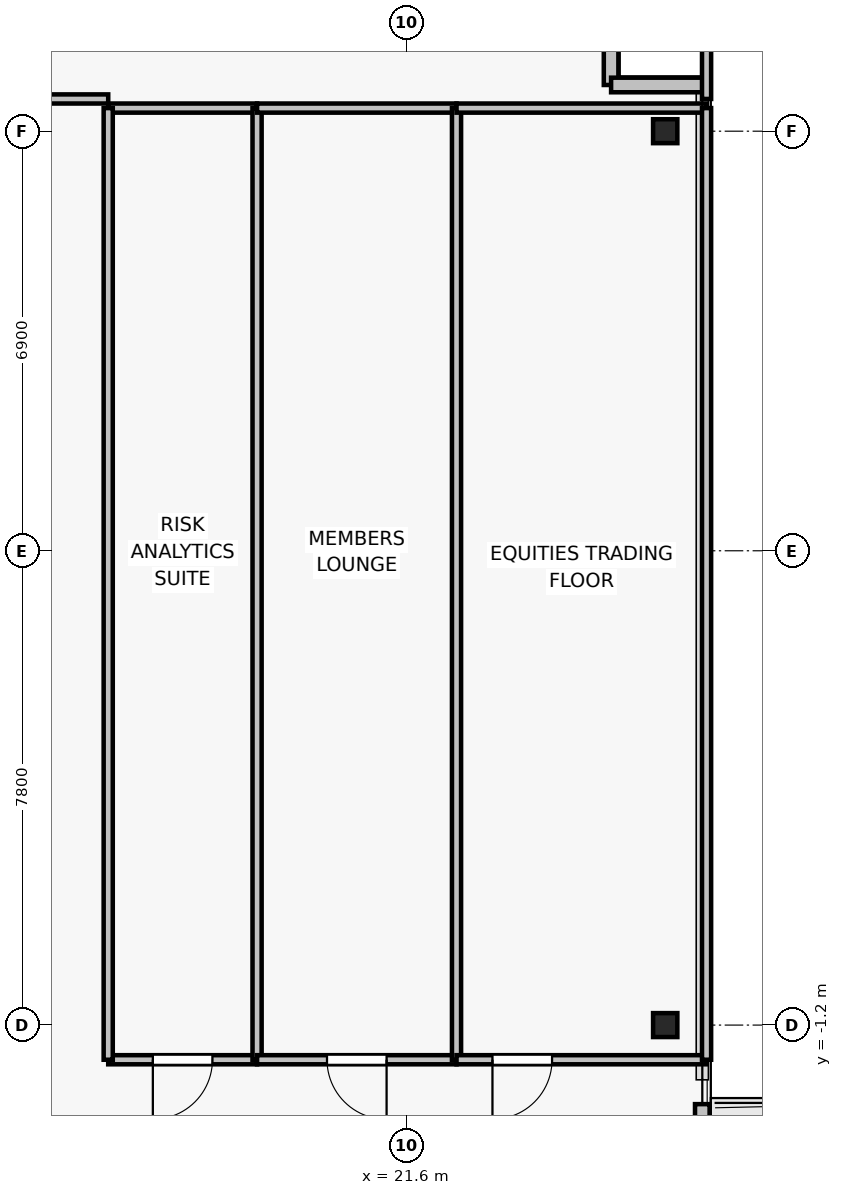
"""IFC4 building model, lengths in metres.
Left out: names, types, materials, properties, quantities, classifications, styles, units other than length and angle.
Written with IfcOpenShell. Run it as: python <this file> out.ifc"""

import sys

from ifc_helpers import new_model, si_unit, direction, frame, frame_2d, origin, origin_2d, place, context, subcontext, project, spatial, rectangle, i_section, extrude, source, transform, mapped, element, fill, save


model = new_model("IFC4")
c1 = context("Model", 3, precision=1e-05, world=origin(), true_north=direction((0.0, 1.0)))
c2 = subcontext(c1, "Body", "Model", "MODEL_VIEW")
j1 = project(units=[si_unit("LENGTHUNIT", "METRE"), si_unit("PLANEANGLEUNIT", "RADIAN")], contexts=[c1])
p1 = place(None, origin())
s1 = spatial("IfcSite", under=j1, at=p1, CompositionType="ELEMENT")
p2 = place(p1, origin())
s2 = spatial("IfcBuilding", under=s1, at=p2, CompositionType="ELEMENT")
p3 = place(p2, frame((0.0, 0.0, 189.1)))
s3 = spatial("IfcBuildingStorey", under=s2, at=p3, CompositionType="ELEMENT", Elevation=189.1)
for number, where, z_axis, x_axis in (
    (1, (25.85, -1.2, 0.0), (0.0, 0.0, 1.0), (1.0, 0.0, 0.0)),
    (2, (25.85, 13.5, 0.0), (0.0, 0.0, 1.0), (1.0, 0.0, 0.0)),
):
    element("IfcColumn", number, at=place(p3, frame(where, z_axis=z_axis, x_axis=x_axis)), inside=s3, PredefinedType="COLUMN", context=c2, shape_type="SweptSolid", body=[
        extrude(i_section(OverallWidth=0.399, OverallDepth=0.394, WebThickness=0.023, FlangeThickness=0.037, FilletRadius=0.015, at=origin_2d()), origin(), (0.0, 0.0, 1.0), 3.3),
    ])
p4 = place(p3, frame((26.46, -2.5, 0.0), z_axis=(0.0, 0.0, 1.0), x_axis=(0.0, -1.0, 0.0)))
e3 = element("IfcWall", 3, at=p4, inside=s3, PredefinedType="SOLIDWALL", context=c2, shape_type="SweptSolid", body=[
    extrude(rectangle(XDim=5.8, YDim=0.24, at=frame_2d((2.9, 0.0))), origin(), (0.0, 0.0, 1.0), 3.075),
])
p5 = place(p4, frame((1.566, 0.0, 0.0)))
e4 = element("IfcOpeningElement", 4, at=p5, cuts=e3, PredefinedType="OPENING", context=c2, shape_type="SweptSolid", body=[
    extrude(rectangle(XDim=1.0, YDim=2.2, at=frame_2d((0.5, 1.1))), frame((0.0, 0.13, 0.0), z_axis=(0.0, -1.0, 0.0), x_axis=(1.0, 0.0, 0.0)), (0.0, 0.0, 1.0), 0.26),
])
p6 = place(p4, frame((2.916, 0.0, 0.85)))
e5 = element("IfcOpeningElement", 5, at=p6, cuts=e3, PredefinedType="OPENING", context=c2, shape_type="SweptSolid", body=[
    extrude(rectangle(XDim=0.9, YDim=1.35, at=frame_2d((0.45, 0.675))), frame((0.0, 0.13, 0.0), z_axis=(0.0, -1.0, 0.0), x_axis=(1.0, 0.0, 0.0)), (0.0, 0.0, 1.0), 0.26),
])
for number, where, z_axis, x_axis in (
    (6, (24.96, 14.26, 0.0), (0.0, 0.0, 1.0), (0.0, 1.0, 0.0)),
    (7, (26.46, 14.26, 0.0), (0.0, 0.0, 1.0), (-1.0, 0.0, 0.0)),
):
    element("IfcWall", number, at=place(p3, frame(where, z_axis=z_axis, x_axis=x_axis)), inside=s3, PredefinedType="SOLIDWALL", context=c2, shape_type="SweptSolid", body=[
        extrude(rectangle(XDim=1.5, YDim=0.24, at=frame_2d((0.75, 0.0))), origin(), (0.0, 0.0, 1.0), 3.075),
    ])
p7 = place(p3, frame((19.138, -1.77, 0.0), z_axis=(0.0, 0.0, 1.0), x_axis=(-1.0, 0.0, 0.0)))
e8 = element("IfcWall", 8, at=p7, inside=s3, PredefinedType="PARTITIONING", context=c2, shape_type="SweptSolid", body=[
    extrude(rectangle(XDim=2.448, YDim=0.15, at=frame_2d((1.224, 0.0))), origin(), (0.0, 0.0, 1.0), 3.075),
])
p8 = place(p7, frame((0.734, 0.0, 0.0)))
e9 = element("IfcOpeningElement", 9, at=p8, cuts=e8, PredefinedType="OPENING", context=c2, shape_type="SweptSolid", body=[
    extrude(rectangle(XDim=0.98, YDim=2.15, at=frame_2d((0.49, 1.075))), frame((0.0, 0.085, 0.0), z_axis=(0.0, -1.0, 0.0), x_axis=(1.0, 0.0, 0.0)), (0.0, 0.0, 1.0), 0.17),
])
p9 = place(p3, frame((16.69, 13.88, 0.0), z_axis=(0.0, 0.0, 1.0), x_axis=(1.0, 0.0, 0.0)))
e10 = element("IfcWall", 10, at=p9, inside=s3, PredefinedType="PARTITIONING", context=c2, shape_type="SweptSolid", body=[
    extrude(rectangle(XDim=2.448, YDim=0.15, at=frame_2d((1.224, 0.0))), origin(), (0.0, 0.0, 1.0), 3.075),
])
for number, where, z_axis, x_axis in (
    (11, (16.69, -1.77, 0.0), (0.0, 0.0, 1.0), (0.0, 1.0, 0.0)),
    (12, (19.138, 13.88, 0.0), (0.0, 0.0, 1.0), (0.0, -1.0, 0.0)),
):
    element("IfcWall", number, at=place(p3, frame(where, z_axis=z_axis, x_axis=x_axis)), inside=s3, PredefinedType="PARTITIONING", context=c2, shape_type="SweptSolid", body=[
        extrude(rectangle(XDim=15.65, YDim=0.15, at=frame_2d((7.825, 0.0))), origin(), (0.0, 0.0, 1.0), 2.565),
    ])
p10 = place(p3, frame((22.418, -1.77, 0.0), z_axis=(0.0, 0.0, 1.0), x_axis=(-1.0, 0.0, 0.0)))
e13 = element("IfcWall", 13, at=p10, inside=s3, PredefinedType="PARTITIONING", context=c2, shape_type="SweptSolid", body=[
    extrude(rectangle(XDim=3.28, YDim=0.15, at=frame_2d((1.64, 0.0))), origin(), (0.0, 0.0, 1.0), 3.075),
])
p11 = place(p10, frame((1.15, 0.0, 0.0)))
e14 = element("IfcOpeningElement", 14, at=p11, cuts=e13, PredefinedType="OPENING", context=c2, shape_type="SweptSolid", body=[
    extrude(rectangle(XDim=0.98, YDim=2.15, at=frame_2d((0.49, 1.075))), frame((0.0, 0.085, 0.0), z_axis=(0.0, -1.0, 0.0), x_axis=(1.0, 0.0, 0.0)), (0.0, 0.0, 1.0), 0.17),
])
p12 = place(p3, frame((19.138, 13.88, 0.0), z_axis=(0.0, 0.0, 1.0), x_axis=(1.0, 0.0, 0.0)))
e15 = element("IfcWall", 15, at=p12, inside=s3, PredefinedType="PARTITIONING", context=c2, shape_type="SweptSolid", body=[
    extrude(rectangle(XDim=3.28, YDim=0.15, at=frame_2d((1.64, 0.0))), origin(), (0.0, 0.0, 1.0), 3.075),
])
p13 = place(p3, frame((22.418, 13.88, 0.0), z_axis=(0.0, 0.0, 1.0), x_axis=(0.0, -1.0, 0.0)))
e16 = element("IfcWall", 16, at=p13, inside=s3, PredefinedType="PARTITIONING", context=c2, shape_type="SweptSolid", body=[
    extrude(rectangle(XDim=15.65, YDim=0.15, at=frame_2d((7.825, 0.0))), origin(), (0.0, 0.0, 1.0), 2.565),
])
p14 = place(p3, frame((26.53, -1.77, 0.0), z_axis=(0.0, 0.0, 1.0), x_axis=(-1.0, 0.0, 0.0)))
e17 = element("IfcWall", 17, at=p14, inside=s3, PredefinedType="PARTITIONING", context=c2, shape_type="SweptSolid", body=[
    extrude(rectangle(XDim=4.112, YDim=0.15, at=frame_2d((2.056, 0.0))), origin(), (0.0, 0.0, 1.0), 2.565),
])
p15 = place(p14, frame((2.541, 0.0, 0.0)))
e18 = element("IfcOpeningElement", 18, at=p15, cuts=e17, PredefinedType="OPENING", context=c2, shape_type="SweptSolid", body=[
    extrude(rectangle(XDim=0.98, YDim=2.15, at=frame_2d((0.49, 1.075))), frame((0.0, 0.085, 0.0), z_axis=(0.0, -1.0, 0.0), x_axis=(1.0, 0.0, 0.0)), (0.0, 0.0, 1.0), 0.17),
])
p16 = place(p3, frame((22.418, 13.88, 0.0), z_axis=(0.0, 0.0, 1.0), x_axis=(1.0, 0.0, 0.0)))
e19 = element("IfcWall", 19, at=p16, inside=s3, PredefinedType="PARTITIONING", context=c2, shape_type="SweptSolid", body=[
    extrude(rectangle(XDim=4.112, YDim=0.15, at=frame_2d((2.056, 0.0))), origin(), (0.0, 0.0, 1.0), 3.075),
])
p17 = place(p3, frame((26.53, 13.88, 0.0), z_axis=(0.0, 0.0, 1.0), x_axis=(0.0, -1.0, 0.0)))
e20 = element("IfcWall", 20, at=p17, inside=s3, PredefinedType="PARTITIONING", context=c2, shape_type="SweptSolid", body=[
    extrude(rectangle(XDim=15.65, YDim=0.15, at=frame_2d((7.825, 0.0))), origin(), (0.0, 0.0, 1.0), 3.075),
])
p18 = place(p3, frame((16.69, 14.03, 0.0), z_axis=(0.0, 0.0, 1.0), x_axis=(-1.0, 0.0, 0.0)))
e21 = element("IfcWall", 21, at=p18, inside=s3, PredefinedType="PARTITIONING", context=c2, shape_type="SweptSolid", body=[
    extrude(rectangle(XDim=2.79, YDim=0.15, at=frame_2d((1.395, 0.0))), origin(), (0.0, 0.0, 1.0), 2.565),
])
p19 = place(p3, frame((26.53, 17.33, 0.0), z_axis=(0.0, 0.0, 1.0), x_axis=(0.0, -1.0, 0.0)))
e22 = element("IfcWall", 22, at=p19, inside=s3, PredefinedType="PARTITIONING", context=c2, shape_type="SweptSolid", body=[
    extrude(rectangle(XDim=3.3, YDim=0.15, at=frame_2d((1.65, 0.0))), origin(), (0.0, 0.0, 1.0), 3.075),
])
m1 = source(origin(), c2, "Body", "SweptSolid", [
    extrude(rectangle(XDim=0.98, YDim=2.15, at=frame_2d((0.49, 1.075))), frame((0.0, 0.025, 0.0), z_axis=(0.0, -1.0, 0.0), x_axis=(1.0, 0.0, 0.0)), (0.0, 0.0, 1.0), 0.05),
])
p20 = place(p8, origin())
e23 = element("IfcDoor", 23, at=p20, inside=s3, OperationType="SINGLE_SWING_RIGHT", PredefinedType="DOOR", context=c2, shape_type="MappedRepresentation", body=[
    mapped(m1, transform((0.0, 0.0, 0.0), x_axis=(1.0, 0.0, 0.0), y_axis=(0.0, 1.0, 0.0), z_axis=(0.0, 0.0, 1.0), scale=1.0)),
])
fill(e9, e23)
p21 = place(p11, origin())
e24 = element("IfcDoor", 24, at=p21, inside=s3, OperationType="SINGLE_SWING_LEFT", PredefinedType="DOOR", context=c2, shape_type="MappedRepresentation", body=[
    mapped(m1, transform((0.0, 0.0, 0.0), x_axis=(1.0, 0.0, 0.0), y_axis=(0.0, 1.0, 0.0), z_axis=(0.0, 0.0, 1.0), scale=1.0)),
])
fill(e14, e24)
p22 = place(p15, origin())
e25 = element("IfcDoor", 25, at=p22, inside=s3, OperationType="SINGLE_SWING_RIGHT", PredefinedType="DOOR", context=c2, shape_type="MappedRepresentation", body=[
    mapped(m1, transform((0.0, 0.0, 0.0), x_axis=(1.0, 0.0, 0.0), y_axis=(0.0, 1.0, 0.0), z_axis=(0.0, 0.0, 1.0), scale=1.0)),
])
fill(e18, e25)
save(model, sys.argv[1])
